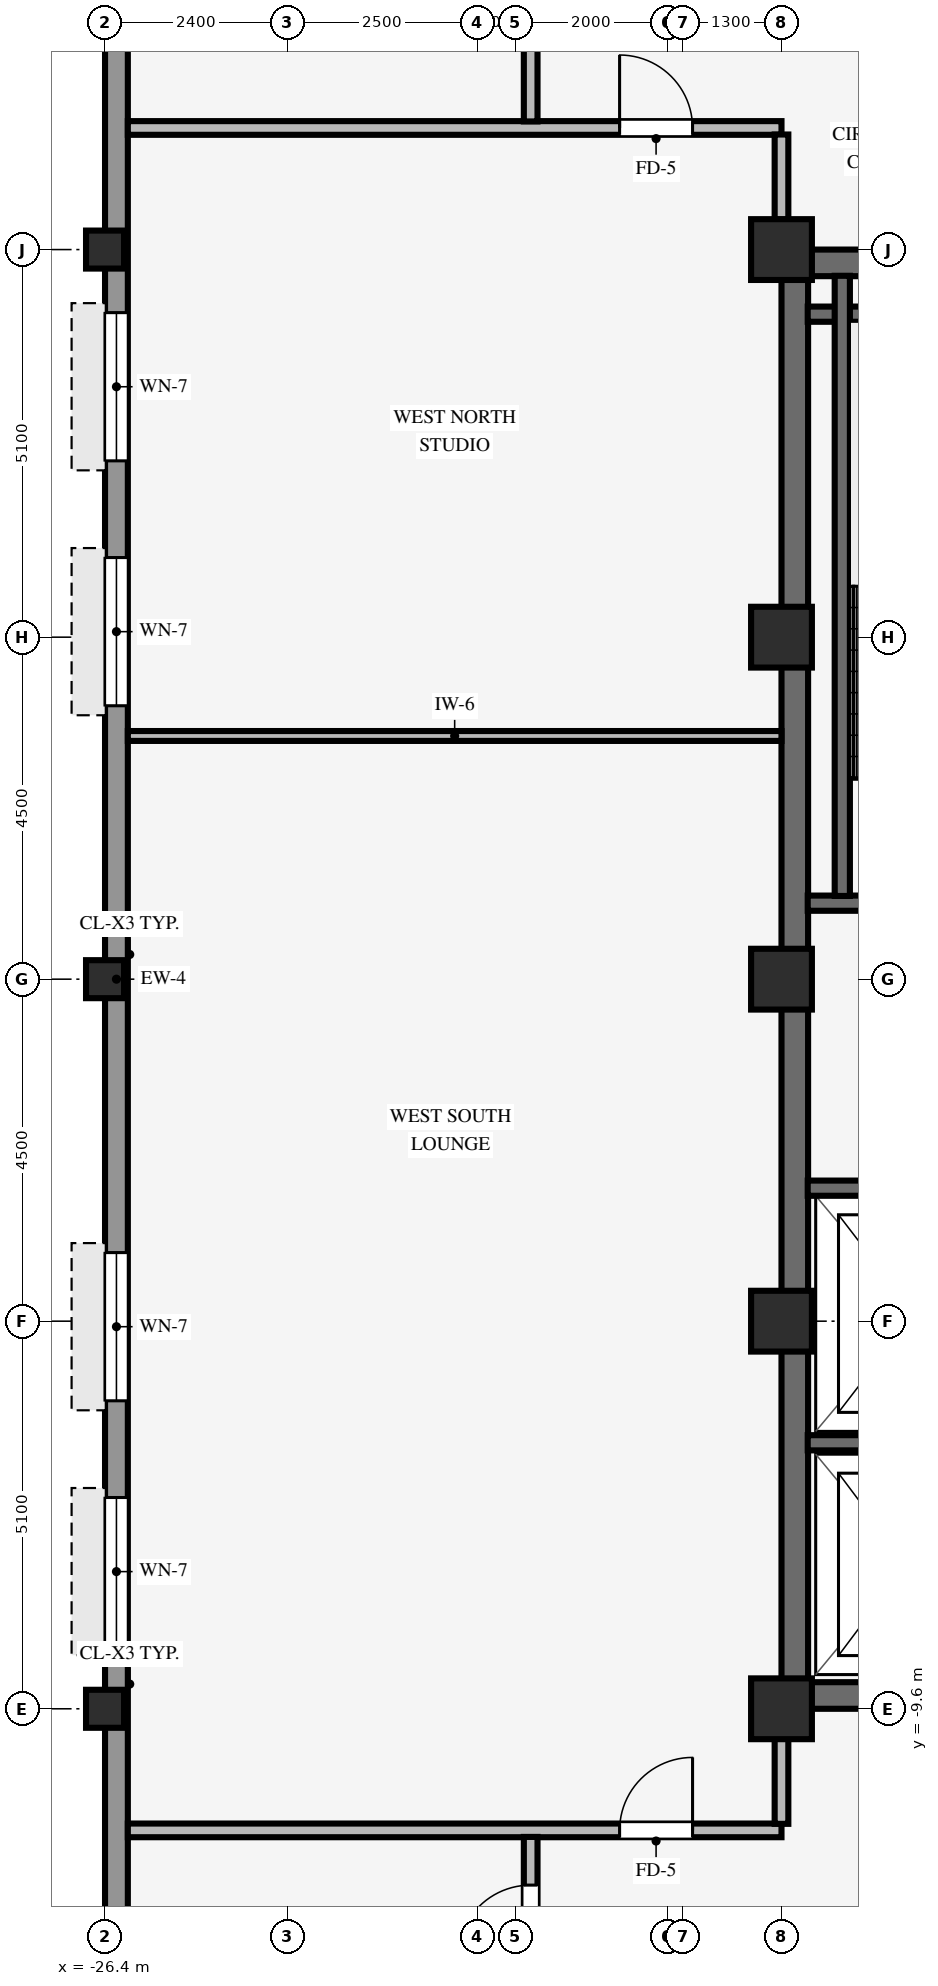
"""IFC4 building model, lengths in metres.
Left out: names, types, materials, properties, quantities, classifications, styles, units other than length and angle.
Written with IfcOpenShell. Run it as: python <this file> out.ifc"""

import sys

from ifc_helpers import new_model, si_unit, direction, frame, frame_2d, origin, origin_2d, place, context, subcontext, project, spatial, rectangle, hollow_rectangle, extrude, source, transform, mapped, element, fill, save


model = new_model("IFC4")
c1 = context("Model", 3, precision=1e-05, world=origin(), true_north=direction((0.0, 1.0)))
c2 = subcontext(c1, "Body", "Model", "MODEL_VIEW")
j1 = project(units=[si_unit("LENGTHUNIT", "METRE"), si_unit("PLANEANGLEUNIT", "RADIAN")], contexts=[c1])
p1 = place(None, origin())
s1 = spatial("IfcSite", under=j1, at=p1, CompositionType="ELEMENT")
p2 = place(p1, origin())
s2 = spatial("IfcBuilding", under=s1, at=p2, CompositionType="ELEMENT")
p3 = place(p2, frame((0.0, 0.0, 238.35)))
s3 = spatial("IfcBuildingStorey", under=s2, at=p3, CompositionType="ELEMENT", Elevation=238.35)
for number, where, z_axis, x_axis in (
    (1, (-17.5, -9.425, 0.0), (0.0, 0.0, 1.0), (1.0, 0.0, 0.0)),
    (2, (-17.5, 9.425, 0.0), (0.0, 0.0, 1.0), (1.0, 0.0, 0.0)),
):
    element("IfcWall", number, at=place(p3, frame(where, z_axis=z_axis, x_axis=x_axis)), inside=s3, PredefinedType="SHEAR", context=c2, shape_type="SweptSolid", body=[
        extrude(rectangle(XDim=8.5, YDim=0.35, at=frame_2d((4.25, 0.0))), origin(), (0.0, 0.0, 1.0), 3.37),
    ])
p4 = place(p3, frame((-17.325, -9.255, 0.0), z_axis=(0.0, 0.0, 1.0), x_axis=(0.0, 1.0, 0.0)))
e3 = element("IfcWall", 3, at=p4, inside=s3, PredefinedType="SHEAR", context=c2, shape_type="SweptSolid", body=[
    extrude(rectangle(XDim=18.51, YDim=0.35, at=frame_2d((9.255, 0.0))), origin(), (0.0, 0.0, 1.0), 3.37),
])
for number, where, z_axis, x_axis in (
    (4, (-17.5, -9.6, 0.0), (0.0, 0.0, 1.0), (1.0, 0.0, 0.0)),
    (5, (-17.5, -4.5, 0.0), (0.0, 0.0, 1.0), (1.0, 0.0, 0.0)),
    (6, (-17.5, 4.5, 0.0), (0.0, 0.0, 1.0), (1.0, 0.0, 0.0)),
    (7, (-17.5, 9.6, 0.0), (0.0, 0.0, 1.0), (1.0, 0.0, 0.0)),
    (8, (-17.5, 0.0, 0.0), (0.0, 0.0, 1.0), (1.0, 0.0, 0.0)),
):
    element("IfcColumn", number, at=place(p3, frame(where, z_axis=z_axis, x_axis=x_axis)), inside=s3, PredefinedType="COLUMN", context=c2, shape_type="SweptSolid", body=[
        extrude(rectangle(XDim=0.8, YDim=0.8, at=origin_2d()), origin(), (0.0, 0.0, 1.0), 3.37),
    ])
for number, where, z_axis, x_axis in (
    (9, (-26.4, -9.6, 0.0), (0.0, 0.0, 1.0), (1.0, 0.0, 0.0)),
    (10, (-26.4, 0.0, 0.0), (0.0, 0.0, 1.0), (1.0, 0.0, 0.0)),
    (11, (-26.4, 9.6, 0.0), (0.0, 0.0, 1.0), (1.0, 0.0, 0.0)),
):
    element("IfcColumn", number, at=place(p3, frame(where, z_axis=z_axis, x_axis=x_axis)), inside=s3, PredefinedType="COLUMN", context=c2, shape_type="SweptSolid", body=[
        extrude(hollow_rectangle(XDim=0.5, YDim=0.5, WallThickness=0.032, InnerFilletRadius=0.032, OuterFilletRadius=0.064, at=origin_2d()), origin(), (0.0, 0.0, 1.0), 3.37),
    ])
p5 = place(p3, frame((-26.25, -17.004, 0.0), z_axis=(0.0, 0.0, 1.0), x_axis=(0.0, 1.0, 0.0)))
e12 = element("IfcWall", 12, at=p5, inside=s3, PredefinedType="STANDARD", context=c2, shape_type="SweptSolid", body=[
    extrude(rectangle(XDim=34.008, YDim=0.3, at=frame_2d((17.004, 0.0))), origin(), (0.0, 0.0, 1.0), 2.705),
])
p6 = place(p5, frame((2.311, 0.0, 0.8)))
e13 = element("IfcOpeningElement", 13, at=p6, cuts=e12, PredefinedType="OPENING", context=c2, shape_type="SweptSolid", body=[
    extrude(rectangle(XDim=1.95, YDim=1.48, at=frame_2d((0.975, 0.74))), frame((0.0, 0.16, 0.0), z_axis=(0.0, -1.0, 0.0), x_axis=(1.0, 0.0, 0.0)), (0.0, 0.0, 1.0), 0.32),
])
p7 = place(p5, frame((8.234, 0.0, 0.8)))
e14 = element("IfcOpeningElement", 14, at=p7, cuts=e12, PredefinedType="OPENING", context=c2, shape_type="SweptSolid", body=[
    extrude(rectangle(XDim=1.95, YDim=1.48, at=frame_2d((0.975, 0.74))), frame((0.0, 0.16, 0.0), z_axis=(0.0, -1.0, 0.0), x_axis=(1.0, 0.0, 0.0)), (0.0, 0.0, 1.0), 0.32),
])
p8 = place(p5, frame((11.456, 0.0, 0.8)))
e15 = element("IfcOpeningElement", 15, at=p8, cuts=e12, PredefinedType="OPENING", context=c2, shape_type="SweptSolid", body=[
    extrude(rectangle(XDim=1.95, YDim=1.48, at=frame_2d((0.975, 0.74))), frame((0.0, 0.16, 0.0), z_axis=(0.0, -1.0, 0.0), x_axis=(1.0, 0.0, 0.0)), (0.0, 0.0, 1.0), 0.32),
])
p9 = place(p5, frame((20.602, 0.0, 0.8)))
e16 = element("IfcOpeningElement", 16, at=p9, cuts=e12, PredefinedType="OPENING", context=c2, shape_type="SweptSolid", body=[
    extrude(rectangle(XDim=1.95, YDim=1.48, at=frame_2d((0.975, 0.74))), frame((0.0, 0.16, 0.0), z_axis=(0.0, -1.0, 0.0), x_axis=(1.0, 0.0, 0.0)), (0.0, 0.0, 1.0), 0.32),
])
p10 = place(p5, frame((23.824, 0.0, 0.8)))
e17 = element("IfcOpeningElement", 17, at=p10, cuts=e12, PredefinedType="OPENING", context=c2, shape_type="SweptSolid", body=[
    extrude(rectangle(XDim=1.95, YDim=1.48, at=frame_2d((0.975, 0.74))), frame((0.0, 0.16, 0.0), z_axis=(0.0, -1.0, 0.0), x_axis=(1.0, 0.0, 0.0)), (0.0, 0.0, 1.0), 0.32),
])
p11 = place(p5, frame((29.747, 0.0, 0.8)))
e18 = element("IfcOpeningElement", 18, at=p11, cuts=e12, PredefinedType="OPENING", context=c2, shape_type="SweptSolid", body=[
    extrude(rectangle(XDim=1.95, YDim=1.48, at=frame_2d((0.975, 0.74))), frame((0.0, 0.16, 0.0), z_axis=(0.0, -1.0, 0.0), x_axis=(1.0, 0.0, 0.0)), (0.0, 0.0, 1.0), 0.32),
])
for number, where, z_axis, x_axis in (
    (19, (-17.155, 1.0, 0.0), (0.0, 0.0, 1.0), (1.0, 0.0, 0.0)),
    (20, (-17.155, 8.75, 0.0), (0.0, 0.0, 1.0), (1.0, 0.0, 0.0)),
):
    element("IfcWall", number, at=place(p3, frame(where, z_axis=z_axis, x_axis=x_axis)), inside=s3, PredefinedType="SHEAR", context=c2, shape_type="SweptSolid", body=[
        extrude(rectangle(XDim=3.62, YDim=0.2, at=frame_2d((1.81, 0.0))), origin(), (0.0, 0.0, 1.0), 3.37),
    ])
p12 = place(p3, frame((-16.7, 1.095, 0.0), z_axis=(0.0, 0.0, 1.0), x_axis=(0.0, 1.0, 0.0)))
e21 = element("IfcWall", 21, at=p12, inside=s3, PredefinedType="SHEAR", context=c2, shape_type="SweptSolid", body=[
    extrude(rectangle(XDim=8.16, YDim=0.2, at=frame_2d((4.08, 0.0))), origin(), (0.0, 0.0, 1.0), 3.37),
])
p13 = place(p3, frame((-17.155, -6.1, 0.0), z_axis=(0.0, 0.0, 1.0), x_axis=(1.0, 0.0, 0.0)))
e22 = element("IfcWall", 22, at=p13, inside=s3, PredefinedType="SHEAR", context=c2, shape_type="SweptSolid", body=[
    extrude(rectangle(XDim=2.905, YDim=0.2, at=frame_2d((1.453, 0.0))), origin(), (0.0, 0.0, 1.0), 3.37),
])
p14 = place(p3, frame((-17.155, -2.75, 0.0), z_axis=(0.0, 0.0, 1.0), x_axis=(1.0, 0.0, 0.0)))
e23 = element("IfcWall", 23, at=p14, inside=s3, PredefinedType="SHEAR", context=c2, shape_type="SweptSolid", body=[
    extrude(rectangle(XDim=2.71, YDim=0.2, at=frame_2d((1.355, 0.0))), origin(), (0.0, 0.0, 1.0), 3.37),
])
p15 = place(p3, frame((-26.1, -11.2, 0.0), z_axis=(0.0, 0.0, 1.0), x_axis=(1.0, 0.0, 0.0)))
e24 = element("IfcWall", 24, at=p15, inside=s3, PredefinedType="PARTITIONING", context=c2, shape_type="SweptSolid", body=[
    extrude(rectangle(XDim=8.6, YDim=0.18, at=frame_2d((4.3, 0.0))), origin(), (0.0, 0.0, 1.0), 3.36),
])
p16 = place(p15, frame((6.47, 0.0, 0.0)))
e25 = element("IfcOpeningElement", 25, at=p16, cuts=e24, PredefinedType="OPENING", context=c2, shape_type="SweptSolid", body=[
    extrude(rectangle(XDim=0.96, YDim=2.1, at=frame_2d((0.48, 1.05))), frame((0.0, 0.1, 0.0), z_axis=(0.0, -1.0, 0.0), x_axis=(1.0, 0.0, 0.0)), (0.0, 0.0, 1.0), 0.2),
])
p17 = place(p3, frame((-26.1, 3.2, 0.0), z_axis=(0.0, 0.0, 1.0), x_axis=(1.0, 0.0, 0.0)))
e26 = element("IfcWall", 26, at=p17, inside=s3, PredefinedType="PARTITIONING", context=c2, shape_type="SweptSolid", body=[
    extrude(rectangle(XDim=8.6, YDim=0.13, at=frame_2d((4.3, 0.0))), origin(), (0.0, 0.0, 1.0), 3.36),
])
p18 = place(p3, frame((-26.1, 11.2, 0.0), z_axis=(0.0, 0.0, 1.0), x_axis=(1.0, 0.0, 0.0)))
e27 = element("IfcWall", 27, at=p18, inside=s3, PredefinedType="PARTITIONING", context=c2, shape_type="SweptSolid", body=[
    extrude(rectangle(XDim=8.6, YDim=0.18, at=frame_2d((4.3, 0.0))), origin(), (0.0, 0.0, 1.0), 3.36),
])
p19 = place(p18, frame((6.47, 0.0, 0.0)))
e28 = element("IfcOpeningElement", 28, at=p19, cuts=e27, PredefinedType="OPENING", context=c2, shape_type="SweptSolid", body=[
    extrude(rectangle(XDim=0.96, YDim=2.1, at=frame_2d((0.48, 1.05))), frame((0.0, 0.1, 0.0), z_axis=(0.0, -1.0, 0.0), x_axis=(1.0, 0.0, 0.0)), (0.0, 0.0, 1.0), 0.2),
])
p20 = place(p3, frame((-20.8, -13.514, 0.0), z_axis=(0.0, 0.0, 1.0), x_axis=(0.0, 1.0, 0.0)))
e29 = element("IfcWall", 29, at=p20, inside=s3, PredefinedType="PARTITIONING", context=c2, shape_type="SweptSolid", body=[
    extrude(rectangle(XDim=2.228, YDim=0.18, at=frame_2d((1.114, 0.0))), origin(), (0.0, 0.0, 1.0), 3.36),
])
p21 = place(p20, frame((0.634, 0.0, 0.0)))
e30 = element("IfcOpeningElement", 30, at=p21, cuts=e29, PredefinedType="OPENING", context=c2, shape_type="SweptSolid", body=[
    extrude(rectangle(XDim=0.96, YDim=2.1, at=frame_2d((0.48, 1.05))), frame((0.0, 0.1, 0.0), z_axis=(0.0, -1.0, 0.0), x_axis=(1.0, 0.0, 0.0)), (0.0, 0.0, 1.0), 0.2),
])
p22 = place(p3, frame((-20.8, 11.286, 0.0), z_axis=(0.0, 0.0, 1.0), x_axis=(0.0, 1.0, 0.0)))
e31 = element("IfcWall", 31, at=p22, inside=s3, PredefinedType="PARTITIONING", context=c2, shape_type="SweptSolid", body=[
    extrude(rectangle(XDim=2.228, YDim=0.18, at=frame_2d((1.114, 0.0))), origin(), (0.0, 0.0, 1.0), 3.36),
])
for number, where, z_axis, x_axis in (
    (32, (-17.5, -11.114, 0.0), (0.0, 0.0, 1.0), (0.0, 1.0, 0.0)),
    (33, (-17.5, 9.996, 0.0), (0.0, 0.0, 1.0), (0.0, 1.0, 0.0)),
):
    element("IfcWall", number, at=place(p3, frame(where, z_axis=z_axis, x_axis=x_axis)), inside=s3, PredefinedType="PARTITIONING", context=c2, shape_type="SweptSolid", body=[
        extrude(rectangle(XDim=1.118, YDim=0.18, at=frame_2d((0.559, 0.0))), origin(), (0.0, 0.0, 1.0), 2.892),
    ])
m1 = source(origin(), c2, "Body", "SweptSolid", [
    extrude(rectangle(XDim=1.95, YDim=1.48, at=frame_2d((0.975, 0.74))), frame((0.0, 0.03, 0.0), z_axis=(0.0, -1.0, 0.0), x_axis=(1.0, 0.0, 0.0)), (0.0, 0.0, 1.0), 0.06),
])
p23 = place(p7, origin())
e34 = element("IfcWindow", 34, at=p23, inside=s3, PartitioningType="SINGLE_PANEL", PredefinedType="WINDOW", context=c2, shape_type="MappedRepresentation", body=[
    mapped(m1, transform((0.0, 0.0, 0.0), scale=1.0)),
])
fill(e14, e34)
p24 = place(p8, origin())
e35 = element("IfcWindow", 35, at=p24, inside=s3, PartitioningType="SINGLE_PANEL", PredefinedType="WINDOW", context=c2, shape_type="MappedRepresentation", body=[
    mapped(m1, transform((0.0, 0.0, 0.0), scale=1.0)),
])
fill(e15, e35)
p25 = place(p9, origin())
e36 = element("IfcWindow", 36, at=p25, inside=s3, PartitioningType="SINGLE_PANEL", PredefinedType="WINDOW", context=c2, shape_type="MappedRepresentation", body=[
    mapped(m1, transform((0.0, 0.0, 0.0), scale=1.0)),
])
fill(e16, e36)
p26 = place(p10, origin())
e37 = element("IfcWindow", 37, at=p26, inside=s3, PartitioningType="SINGLE_PANEL", PredefinedType="WINDOW", context=c2, shape_type="MappedRepresentation", body=[
    mapped(m1, transform((0.0, 0.0, 0.0), scale=1.0)),
])
fill(e17, e37)
m2 = source(origin(), c2, "Body", "SweptSolid", [
    extrude(rectangle(XDim=0.96, YDim=2.1, at=frame_2d((0.48, 1.05))), frame((0.0, 0.025, 0.0), z_axis=(0.0, -1.0, 0.0), x_axis=(1.0, 0.0, 0.0)), (0.0, 0.0, 1.0), 0.05),
])
p27 = place(p16, origin())
e38 = element("IfcDoor", 38, at=p27, inside=s3, OperationType="SINGLE_SWING_RIGHT", PredefinedType="DOOR", context=c2, shape_type="MappedRepresentation", body=[
    mapped(m2, transform((0.0, 0.0, 0.0), scale=1.0)),
])
fill(e25, e38)
p28 = place(p19, origin())
e39 = element("IfcDoor", 39, at=p28, inside=s3, OperationType="SINGLE_SWING_LEFT", PredefinedType="DOOR", context=c2, shape_type="MappedRepresentation", body=[
    mapped(m2, transform((0.0, 0.0, 0.0), scale=1.0)),
])
fill(e28, e39)
p29 = place(p21, origin())
e40 = element("IfcDoor", 40, at=p29, inside=s3, OperationType="SINGLE_SWING_LEFT", PredefinedType="DOOR", context=c2, shape_type="MappedRepresentation", body=[
    mapped(m2, transform((0.0, 0.0, 0.0), scale=1.0)),
])
fill(e30, e40)
save(model, sys.argv[1])
